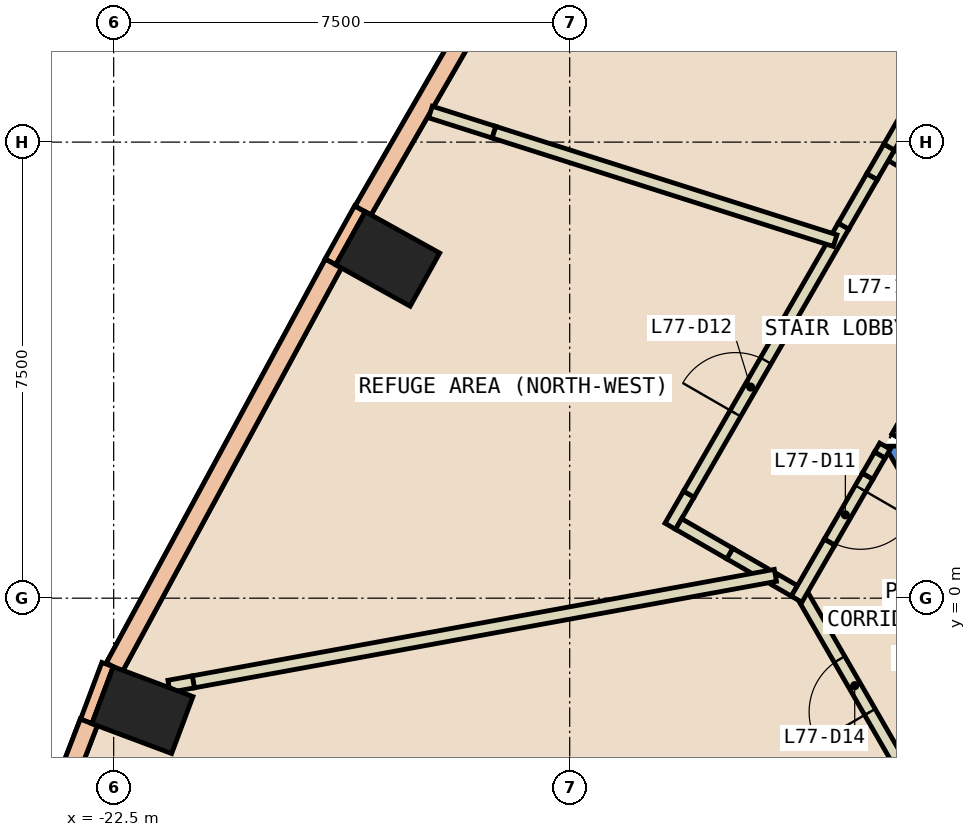
"""IFC4 building model, lengths in metres.
Left out: names, types, materials, properties, quantities, classifications, styles, units other than length and angle.
Written with IfcOpenShell. Run it as: python <this file> out.ifc"""

import sys

from ifc_helpers import new_model, si_unit, direction, frame, frame_2d, origin, origin_2d, place, context, subcontext, project, spatial, polyline, rectangle, outline, extrude, element, fill, save


model = new_model("IFC4")
c1 = context("Model", 3, precision=1e-05, world=origin(), true_north=direction((0.0, 1.0)))
c2 = subcontext(c1, "Body", "Model", "MODEL_VIEW")
j1 = project(units=[si_unit("LENGTHUNIT", "METRE"), si_unit("PLANEANGLEUNIT", "RADIAN")], contexts=[c1])
p1 = place(None, origin())
s1 = spatial("IfcSite", under=j1, at=p1, CompositionType="ELEMENT")
p2 = place(p1, origin())
s2 = spatial("IfcBuilding", under=s1, at=p2, CompositionType="ELEMENT")
p3 = place(p2, frame((0.0, 0.0, 326.0)))
s3 = spatial("IfcBuildingStorey", under=s2, at=p3, CompositionType="ELEMENT", Elevation=326.0)
for number, where, z_axis, x_axis in (
    (1, (-17.993, 5.579, -0.6), (0.0, 0.0, 1.0), (0.486, 0.874, 0.0)),
    (2, (-22.027, -1.841, -0.6), (0.0, 0.0, 1.0), (0.351, 0.936, 0.0)),
):
    element("IfcColumn", number, at=place(p3, frame(where, z_axis=z_axis, x_axis=x_axis)), inside=s3, PredefinedType="COLUMN", context=c2, shape_type="SweptSolid", body=[
        extrude(rectangle(XDim=1.0, YDim=1.4, at=origin_2d()), origin(), (0.0, 0.0, 1.0), 5.55),
    ])
p4 = place(p3, frame((0.0, 0.0, 3.6)))
e3 = element("IfcWall", 3, at=p4, inside=s3, PredefinedType="SHEAR", context=c2, shape_type="SweptSolid", body=[
    extrude(outline(polyline([(-9.7, 2.7), (-9.354, 2.5), (-9.238, 2.5), (-8.803, 3.253), (-9.236, 3.502), (-9.7, 2.7)])), origin(), (0.0, 0.0, 1.0), 1.35),
])
p5 = place(p3, frame((0.0, 0.0, -0.6)))
e4 = element("IfcWall", 4, at=p5, inside=s3, PredefinedType="SHEAR", context=c2, shape_type="SweptSolid", body=[
    extrude(outline(polyline([(-9.815, 2.5), (-4.907, -6.0), (-4.619, -5.5), (-9.238, 2.5), (-9.815, 2.5)])), origin(), (0.0, 0.0, 1.0), 5.55),
])
p6 = place(p3, frame((-18.45, 6.404, 0.0), z_axis=(0.0, 0.0, 1.0), x_axis=(-0.486036693078, -0.873938403425, 0.0)))
e5 = element("IfcWall", 5, at=p6, inside=s3, PredefinedType="STANDARD", context=c2, shape_type="SweptSolid", body=[
    extrude(rectangle(XDim=1.0, YDim=0.2, at=frame_2d((0.5, 0.0))), origin(), (0.0, 0.0, 1.0), 4.95),
])
p7 = place(p3, frame((-22.601, -1.092, 0.0), z_axis=(0.0, 0.0, 1.0), x_axis=(-0.350962844851, -0.936389385637, 0.0)))
e6 = element("IfcWall", 6, at=p7, inside=s3, PredefinedType="STANDARD", context=c2, shape_type="SweptSolid", body=[
    extrude(rectangle(XDim=1.0, YDim=0.2, at=frame_2d((0.5, 0.0))), origin(), (0.0, 0.0, 1.0), 4.95),
])
p8 = place(p3, frame((-14.721, 12.747, 0.0), z_axis=(0.0, 0.0, 1.0), x_axis=(-0.499904379019, -0.866080603545, 0.0)))
e7 = element("IfcWall", 7, at=p8, inside=s3, PredefinedType="STANDARD", context=c2, shape_type="SweptSolid", body=[
    extrude(rectangle(XDim=7.357, YDim=0.3, at=frame_2d((3.679, 0.0))), origin(), (0.0, 0.0, 1.0), 1.2),
])
p9 = place(p3, frame((-14.721, 12.747, 4.15), z_axis=(0.0, 0.0, 1.0), x_axis=(-0.499904379019, -0.866080603545, 0.0)))
e8 = element("IfcWall", 8, at=p9, inside=s3, PredefinedType="STANDARD", context=c2, shape_type="SweptSolid", body=[
    extrude(rectangle(XDim=7.357, YDim=0.3, at=frame_2d((3.679, 0.0))), origin(), (0.0, 0.0, 1.0), 0.8),
])
p10 = place(p3, frame((-18.887, 5.504, 0.0), z_axis=(0.0, 0.0, 1.0), x_axis=(-0.476794367741, -0.879014863862, 0.0)))
e9 = element("IfcWall", 9, at=p10, inside=s3, PredefinedType="STANDARD", context=c2, shape_type="SweptSolid", body=[
    extrude(rectangle(XDim=7.553, YDim=0.3, at=frame_2d((3.776, 0.0))), origin(), (0.0, 0.0, 1.0), 1.2),
])
p11 = place(p3, frame((-18.887, 5.504, 4.15), z_axis=(0.0, 0.0, 1.0), x_axis=(-0.476794367741, -0.879014863862, 0.0)))
e10 = element("IfcWall", 10, at=p11, inside=s3, PredefinedType="STANDARD", context=c2, shape_type="SweptSolid", body=[
    extrude(rectangle(XDim=7.553, YDim=0.3, at=frame_2d((3.776, 0.0))), origin(), (0.0, 0.0, 1.0), 0.8),
])
p12 = place(p3, frame((-22.909, -2.043, 0.0), z_axis=(0.0, 0.0, 1.0), x_axis=(-0.35964980127, -0.933087359493, 0.0)))
e11 = element("IfcWall", 11, at=p12, inside=s3, PredefinedType="STANDARD", context=c2, shape_type="SweptSolid", body=[
    extrude(rectangle(XDim=5.0, YDim=0.3, at=frame_2d((2.5, 0.0))), origin(), (0.0, 0.0, 1.0), 1.2),
])
p13 = place(p3, frame((-22.909, -2.043, 4.15), z_axis=(0.0, 0.0, 1.0), x_axis=(-0.35964980127, -0.933087359493, 0.0)))
e12 = element("IfcWall", 12, at=p13, inside=s3, PredefinedType="STANDARD", context=c2, shape_type="SweptSolid", body=[
    extrude(rectangle(XDim=5.0, YDim=0.3, at=frame_2d((2.5, 0.0))), origin(), (0.0, 0.0, 1.0), 0.8),
])
p14 = place(p3, frame((-9.796, 7.332, 0.0), z_axis=(0.0, 0.0, 1.0), x_axis=(0.865973769406, -0.500089422704, 0.0)))
e13 = element("IfcWall", 13, at=p14, inside=s3, PredefinedType="PARTITIONING", context=c2, shape_type="SweptSolid", body=[
    extrude(rectangle(XDim=2.399, YDim=0.2, at=frame_2d((1.2, 0.0))), origin(), (0.0, 0.0, 1.0), 4.95),
])
p15 = place(p14, frame((0.6, 0.0, 0.0)))
e14 = element("IfcOpeningElement", 14, at=p15, cuts=e13, PredefinedType="OPENING", context=c2, shape_type="SweptSolid", body=[
    extrude(rectangle(XDim=1.0, YDim=2.1, at=frame_2d((0.5, 1.05))), frame((0.0, 0.11, 0.0), z_axis=(0.0, -1.0, 0.0), x_axis=(1.0, 0.0, 0.0)), (0.0, 0.0, 1.0), 0.22),
])
p16 = place(p3, frame((-9.815, 2.5, 0.0), z_axis=(0.0, 0.0, 1.0), x_axis=(-0.5004692653, -0.865754303766, 0.0)))
e15 = element("IfcWall", 15, at=p16, inside=s3, PredefinedType="PARTITIONING", context=c2, shape_type="SweptSolid", body=[
    extrude(rectangle(XDim=0.17, YDim=0.2, at=frame_2d((0.085, 0.0))), origin(), (0.0, 0.0, 1.0), 2.4),
])
p17 = place(p3, frame((-11.802, 0.407, 0.0), z_axis=(0.0, 0.0, 1.0), x_axis=(-0.865911816314, 0.500196687681, 0.0)))
e16 = element("IfcWall", 16, at=p17, inside=s3, PredefinedType="PARTITIONING", context=c2, shape_type="SweptSolid", body=[
    extrude(rectangle(XDim=0.654, YDim=0.2, at=frame_2d((0.327, 0.0))), origin(), (0.0, 0.0, 1.0), 4.95),
])
p18 = place(p3, frame((-13.346, 1.183, 0.0), z_axis=(0.0, 0.0, 1.0), x_axis=(0.500230888849, 0.865892059001, 0.0)))
e17 = element("IfcWall", 17, at=p18, inside=s3, PredefinedType="PARTITIONING", context=c2, shape_type="SweptSolid", body=[
    extrude(rectangle(XDim=0.61, YDim=0.2, at=frame_2d((0.305, 0.0))), origin(), (0.0, 0.0, 1.0), 2.55),
])
p19 = place(p3, frame((-11.305, 0.12, 0.0), z_axis=(0.0, 0.0, 1.0), x_axis=(-0.865694957185, 0.500571914019, 0.0)))
e18 = element("IfcWall", 18, at=p19, inside=s3, PredefinedType="PARTITIONING", context=c2, shape_type="SweptSolid", body=[
    extrude(rectangle(XDim=0.373, YDim=0.2, at=frame_2d((0.187, 0.0))), origin(), (0.0, 0.0, 1.0), 4.95),
])
p20 = place(p3, frame((-9.44, -2.95, 0.0), z_axis=(0.0, 0.0, 1.0), x_axis=(-0.500008478926, 0.866020508419, 0.0)))
e19 = element("IfcWall", 19, at=p20, inside=s3, PredefinedType="PARTITIONING", context=c2, shape_type="SweptSolid", body=[
    extrude(rectangle(XDim=3.522, YDim=0.2, at=frame_2d((1.761, 0.0))), origin(), (0.0, 0.0, 1.0), 4.95),
])
p21 = place(p20, frame((1.245, 0.0, 0.0)))
e20 = element("IfcOpeningElement", 20, at=p21, cuts=e19, PredefinedType="OPENING", context=c2, shape_type="SweptSolid", body=[
    extrude(rectangle(XDim=1.0, YDim=2.1, at=frame_2d((0.5, 1.05))), frame((0.0, 0.11, 0.0), z_axis=(0.0, -1.0, 0.0), x_axis=(1.0, 0.0, 0.0)), (0.0, 0.0, 1.0), 0.22),
])
p22 = place(p3, frame((-17.29, 7.995, 0.0), z_axis=(0.0, 0.0, 1.0), x_axis=(0.953042685806, -0.302835993621, 0.0)))
e21 = element("IfcWall", 21, at=p22, inside=s3, PredefinedType="PARTITIONING", context=c2, shape_type="SweptSolid", body=[
    extrude(rectangle(XDim=1.096, YDim=0.2, at=frame_2d((0.548, 0.0))), origin(), (0.0, 0.0, 1.0), 2.55),
])
p23 = place(p3, frame((-11.617, 0.375, 0.0), z_axis=(0.0, 0.0, 1.0), x_axis=(-0.983680709819, -0.179922931086, 0.0)))
e22 = element("IfcWall", 22, at=p23, inside=s3, PredefinedType="PARTITIONING", context=c2, shape_type="SweptSolid", body=[
    extrude(rectangle(XDim=9.732, YDim=0.2, at=frame_2d((4.866, 0.0))), origin(), (0.0, 0.0, 1.0), 4.95),
])
p24 = place(p3, frame((-9.15, 3.452, 0.0), z_axis=(0.0, 0.0, 1.0), x_axis=(-0.500079945886, -0.865979242085, 0.0)))
e23 = element("IfcWall", 23, at=p24, inside=s3, PredefinedType="PARTITIONING", context=c2, shape_type="SweptSolid", body=[
    extrude(rectangle(XDim=0.926, YDim=0.2, at=frame_2d((0.463, 0.0))), origin(), (0.0, 0.0, 1.0), 2.4),
])
p25 = place(p24, frame((0.017, 0.0, 0.0)))
e24 = element("IfcOpeningElement", 24, at=p25, cuts=e23, PredefinedType="OPENING", context=c2, shape_type="SweptSolid", body=[
    extrude(rectangle(XDim=0.9, YDim=2.1, at=frame_2d((0.45, 1.05))), frame((0.0, 0.11, 0.0), z_axis=(0.0, -1.0, 0.0), x_axis=(1.0, 0.0, 0.0)), (0.0, 0.0, 1.0), 0.22),
])
p26 = place(p3, frame((-22.497, -10.489, 0.0), z_axis=(0.0, 0.0, 1.0), x_axis=(0.866019262169, 0.500010637439, 0.0)))
e25 = element("IfcWall", 25, at=p26, inside=s3, PredefinedType="PARTITIONING", context=c2, shape_type="SweptSolid", body=[
    extrude(rectangle(XDim=17.478, YDim=0.2, at=frame_2d((8.739, 0.0))), origin(), (0.0, 0.0, 1.0), 4.95),
])
p27 = place(p3, frame((-9.9, 2.353, 0.0), z_axis=(0.0, 0.0, 1.0), x_axis=(-0.499267785915, -0.866447735266, 0.0)))
e26 = element("IfcWall", 26, at=p27, inside=s3, PredefinedType="PARTITIONING", context=c2, shape_type="SweptSolid", body=[
    extrude(rectangle(XDim=0.403, YDim=0.2, at=frame_2d((0.201, 0.0))), origin(), (0.0, 0.0, 1.0), 4.95),
])
p28 = place(p3, frame((-10.101, 2.004, 0.0), z_axis=(0.0, 0.0, 1.0), x_axis=(-0.50008261738, -0.865977699363, 0.0)))
e27 = element("IfcWall", 27, at=p28, inside=s3, PredefinedType="PARTITIONING", context=c2, shape_type="SweptSolid", body=[
    extrude(rectangle(XDim=1.252, YDim=0.2, at=frame_2d((0.626, 0.0))), origin(), (0.0, 0.0, 1.0), 2.55),
])
p29 = place(p28, frame((0.231, 0.0, 0.0)))
e28 = element("IfcOpeningElement", 28, at=p29, cuts=e27, PredefinedType="OPENING", context=c2, shape_type="SweptSolid", body=[
    extrude(rectangle(XDim=1.0, YDim=2.1, at=frame_2d((0.5, 1.05))), frame((0.0, 0.11, 0.0), z_axis=(0.0, -1.0, 0.0), x_axis=(1.0, 0.0, 0.0)), (0.0, 0.0, 1.0), 0.22),
])
p30 = place(p3, frame((-10.727, 0.92, 0.0), z_axis=(0.0, 0.0, 1.0), x_axis=(-0.500021943523, -0.866012734315, 0.0)))
e29 = element("IfcWall", 29, at=p30, inside=s3, PredefinedType="PARTITIONING", context=c2, shape_type="SweptSolid", body=[
    extrude(rectangle(XDim=1.082, YDim=0.2, at=frame_2d((0.541, 0.0))), origin(), (0.0, 0.0, 1.0), 4.95),
])
p31 = place(p3, frame((-12.368, 0.734, 0.0), z_axis=(0.0, 0.0, 1.0), x_axis=(-0.865804585852, 0.500382272985, 0.0)))
e30 = element("IfcWall", 30, at=p31, inside=s3, PredefinedType="PARTITIONING", context=c2, shape_type="SweptSolid", body=[
    extrude(rectangle(XDim=0.971, YDim=0.2, at=frame_2d((0.486, 0.0))), origin(), (0.0, 0.0, 1.0), 2.55),
])
p32 = place(p3, frame((-13.041, 1.711, 0.0), z_axis=(0.0, 0.0, 1.0), x_axis=(0.499853954338, 0.866109706869, 0.0)))
e31 = element("IfcWall", 31, at=p32, inside=s3, PredefinedType="PARTITIONING", context=c2, shape_type="SweptSolid", body=[
    extrude(rectangle(XDim=5.089, YDim=0.2, at=frame_2d((2.545, 0.0))), origin(), (0.0, 0.0, 1.0), 4.95),
])
p33 = place(p32, frame((1.533, 0.0, 0.0)))
e32 = element("IfcOpeningElement", 32, at=p33, cuts=e31, PredefinedType="OPENING", context=c2, shape_type="SweptSolid", body=[
    extrude(rectangle(XDim=1.0, YDim=2.1, at=frame_2d((0.5, 1.05))), frame((0.0, 0.11, 0.0), z_axis=(0.0, -1.0, 0.0), x_axis=(1.0, 0.0, 0.0)), (0.0, 0.0, 1.0), 0.22),
])
p34 = place(p3, frame((-10.497, 6.119, 0.0), z_axis=(0.0, 0.0, 1.0), x_axis=(0.499909789979, 0.8660774803, 0.0)))
e33 = element("IfcWall", 33, at=p34, inside=s3, PredefinedType="PARTITIONING", context=c2, shape_type="SweptSolid", body=[
    extrude(rectangle(XDim=0.94, YDim=0.2, at=frame_2d((0.47, 0.0))), origin(), (0.0, 0.0, 1.0), 2.55),
])
p35 = place(p3, frame((-10.027, 6.933, 0.0), z_axis=(0.0, 0.0, 1.0), x_axis=(0.500676140182, 0.865634681983, 0.0)))
e34 = element("IfcWall", 34, at=p35, inside=s3, PredefinedType="PARTITIONING", context=c2, shape_type="SweptSolid", body=[
    extrude(rectangle(XDim=0.561, YDim=0.2, at=frame_2d((0.281, 0.0))), origin(), (0.0, 0.0, 1.0), 4.95),
])
p36 = place(p3, frame((-7.444, 11.407, 0.0), z_axis=(0.0, 0.0, 1.0), x_axis=(-0.499919806806, -0.866071698396, 0.0)))
e35 = element("IfcWall", 35, at=p36, inside=s3, PredefinedType="PARTITIONING", context=c2, shape_type="SweptSolid", body=[
    extrude(rectangle(XDim=4.605, YDim=0.2, at=frame_2d((2.302, 0.0))), origin(), (0.0, 0.0, 1.0), 4.95),
])
p37 = place(p3, frame((-16.245, 7.663, 0.0), z_axis=(0.0, 0.0, 1.0), x_axis=(0.953015609999, -0.302921189583, 0.0)))
e36 = element("IfcWall", 36, at=p37, inside=s3, PredefinedType="PARTITIONING", context=c2, shape_type="SweptSolid", body=[
    extrude(rectangle(XDim=5.887, YDim=0.2, at=frame_2d((2.943, 0.0))), origin(), (0.0, 0.0, 1.0), 4.95),
])
p38 = place(p3, frame((-21.19, -1.376, 0.0), z_axis=(0.0, 0.0, 1.0), x_axis=(-0.983764099446, -0.179466422046, 0.0)))
e37 = element("IfcWall", 37, at=p38, inside=s3, PredefinedType="PARTITIONING", context=c2, shape_type="SweptSolid", body=[
    extrude(rectangle(XDim=0.407, YDim=0.2, at=frame_2d((0.203, 0.0))), origin(), (0.0, 0.0, 1.0), 2.55),
])
p39 = place(p29, origin())
e38 = element("IfcDoor", 38, at=p39, inside=s3, OperationType="SINGLE_SWING_RIGHT", PredefinedType="DOOR", context=c2, shape_type="SweptSolid", body=[
    extrude(rectangle(XDim=1.0, YDim=2.1, at=frame_2d((0.5, 1.05))), frame((0.0, 0.025, 0.0), z_axis=(0.0, -1.0, 0.0), x_axis=(1.0, 0.0, 0.0)), (0.0, 0.0, 1.0), 0.05),
])
fill(e28, e38)
p40 = place(p33, origin())
e39 = element("IfcDoor", 39, at=p40, inside=s3, OperationType="SINGLE_SWING_LEFT", PredefinedType="DOOR", context=c2, shape_type="SweptSolid", body=[
    extrude(rectangle(XDim=1.0, YDim=2.1, at=frame_2d((0.5, 1.05))), frame((0.0, 0.025, 0.0), z_axis=(0.0, -1.0, 0.0), x_axis=(1.0, 0.0, 0.0)), (0.0, 0.0, 1.0), 0.05),
])
fill(e32, e39)
p41 = place(p21, origin())
e40 = element("IfcDoor", 40, at=p41, inside=s3, OperationType="SINGLE_SWING_LEFT", PredefinedType="DOOR", context=c2, shape_type="SweptSolid", body=[
    extrude(rectangle(XDim=1.0, YDim=2.1, at=frame_2d((0.5, 1.05))), frame((0.0, 0.025, 0.0), z_axis=(0.0, -1.0, 0.0), x_axis=(1.0, 0.0, 0.0)), (0.0, 0.0, 1.0), 0.05),
])
fill(e20, e40)
save(model, sys.argv[1])
